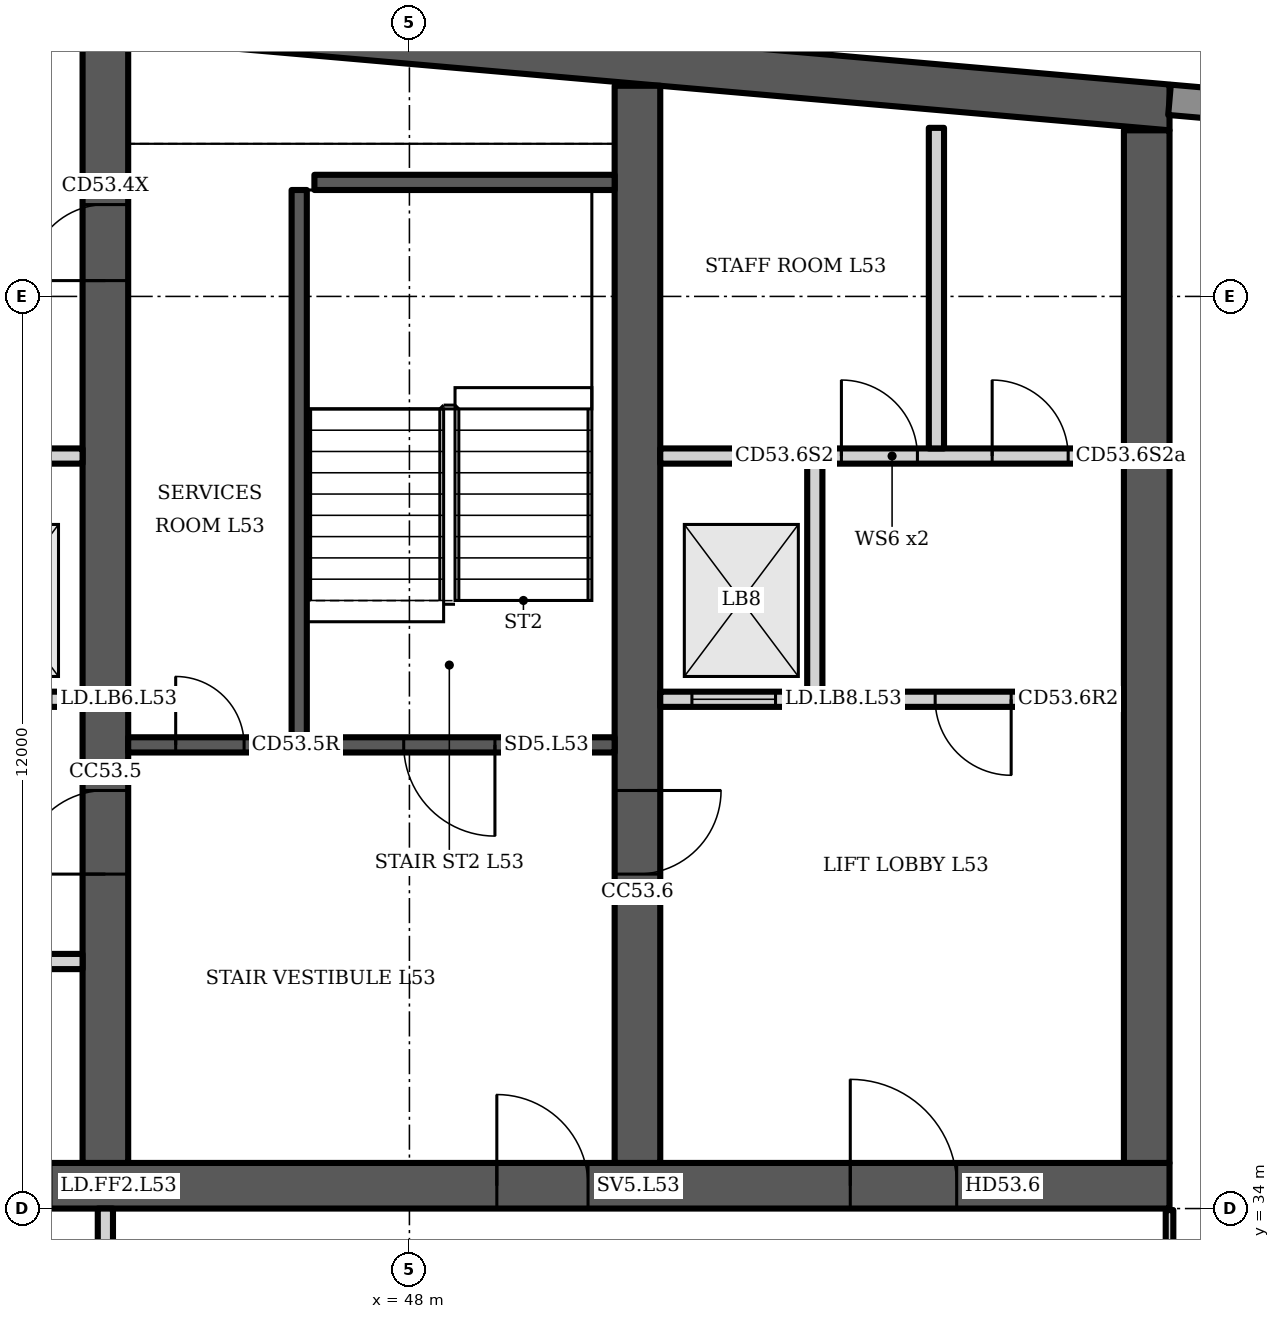
"""IFC4 building model, lengths in metres.
Left out: names, types, materials, properties, quantities, classifications, styles, units other than length and angle.
Written with IfcOpenShell. Run it as: python <this file> out.ifc"""

import sys

from ifc_helpers import new_model, si_unit, direction, frame, frame_2d, origin, place, context, subcontext, project, spatial, polyline, rectangle, outline, extrude, element, fill, save


model = new_model("IFC4")
c1 = context("Model", 3, precision=1e-05, world=origin(), true_north=direction((0.0, 1.0)))
c2 = subcontext(c1, "Body", "Model", "MODEL_VIEW")
j1 = project(units=[si_unit("LENGTHUNIT", "METRE"), si_unit("PLANEANGLEUNIT", "RADIAN")], contexts=[c1])
p1 = place(None, origin())
s1 = spatial("IfcSite", under=j1, at=p1, CompositionType="ELEMENT")
p2 = place(p1, origin())
s2 = spatial("IfcBuilding", under=s1, at=p2, CompositionType="ELEMENT")
p3 = place(p2, frame((0.0, 0.0, 214.3)))
s3 = spatial("IfcBuildingStorey", under=s2, at=p3, CompositionType="ELEMENT", Elevation=214.3)
p4 = place(p3, frame((0.0, 0.0, -0.0)))
e1 = element("IfcWall", 1, at=p4, inside=s3, PredefinedType="SHEAR", context=c2, shape_type="SweptSolid", body=[
    extrude(outline(polyline([(23.0, 48.185), (40.5, 49.716), (58.0, 48.185), (58.0, 48.787), (40.5, 50.318), (23.0, 48.787), (23.0, 48.185)])), origin(), (0.0, 0.0, 1.0), 3.6),
])
p5 = place(p3, frame((23.0, 34.3, 0.0), z_axis=(0.0, 0.0, 1.0), x_axis=(1.0, 0.0, 0.0)))
e2 = element("IfcWall", 2, at=p5, inside=s3, PredefinedType="SHEAR", context=c2, shape_type="SweptSolid", body=[
    extrude(rectangle(XDim=35.0, YDim=0.6, at=frame_2d((17.5, 0.0))), origin(), (0.0, 0.0, 1.0), 3.6),
])
p6 = place(p5, frame((0.65, 0.0, 0.0)))
e3 = element("IfcOpeningElement", 3, at=p6, cuts=e2, PredefinedType="OPENING", context=c2, shape_type="SweptSolid", body=[
    extrude(rectangle(XDim=1.2, YDim=2.1, at=frame_2d((0.6, 1.05))), frame((0.0, 0.31, 0.0), z_axis=(0.0, -1.0, 0.0), x_axis=(1.0, 0.0, 0.0)), (0.0, 0.0, 1.0), 0.62),
])
p7 = place(p5, frame((7.717, 0.0, 0.0)))
e4 = element("IfcOpeningElement", 4, at=p7, cuts=e2, PredefinedType="OPENING", context=c2, shape_type="SweptSolid", body=[
    extrude(rectangle(XDim=1.1, YDim=2.1, at=frame_2d((0.55, 1.05))), frame((0.0, 0.31, 0.0), z_axis=(0.0, -1.0, 0.0), x_axis=(1.0, 0.0, 0.0)), (0.0, 0.0, 1.0), 0.62),
])
p8 = place(p5, frame((12.183, 0.0, 0.0)))
e5 = element("IfcOpeningElement", 5, at=p8, cuts=e2, PredefinedType="OPENING", context=c2, shape_type="SweptSolid", body=[
    extrude(rectangle(XDim=1.1, YDim=2.1, at=frame_2d((0.55, 1.05))), frame((0.0, 0.31, 0.0), z_axis=(0.0, -1.0, 0.0), x_axis=(1.0, 0.0, 0.0)), (0.0, 0.0, 1.0), 0.62),
])
p9 = place(p5, frame((9.8, 0.0, 0.0)))
e6 = element("IfcOpeningElement", 6, at=p9, cuts=e2, PredefinedType="OPENING", context=c2, shape_type="SweptSolid", body=[
    extrude(rectangle(XDim=1.4, YDim=2.1, at=frame_2d((0.7, 1.05))), frame((0.0, 0.31, 0.0), z_axis=(0.0, -1.0, 0.0), x_axis=(1.0, 0.0, 0.0)), (0.0, 0.0, 1.0), 0.62),
])
p10 = place(p5, frame((14.717, 0.0, 0.0)))
e7 = element("IfcOpeningElement", 7, at=p10, cuts=e2, PredefinedType="OPENING", context=c2, shape_type="SweptSolid", body=[
    extrude(rectangle(XDim=1.1, YDim=2.1, at=frame_2d((0.55, 1.05))), frame((0.0, 0.31, 0.0), z_axis=(0.0, -1.0, 0.0), x_axis=(1.0, 0.0, 0.0)), (0.0, 0.0, 1.0), 0.62),
])
p11 = place(p5, frame((16.95, 0.0, 0.0)))
e8 = element("IfcOpeningElement", 8, at=p11, cuts=e2, PredefinedType="OPENING", context=c2, shape_type="SweptSolid", body=[
    extrude(rectangle(XDim=1.1, YDim=2.1, at=frame_2d((0.55, 1.05))), frame((0.0, 0.31, 0.0), z_axis=(0.0, -1.0, 0.0), x_axis=(1.0, 0.0, 0.0)), (0.0, 0.0, 1.0), 0.62),
])
p12 = place(p5, frame((19.183, 0.0, 0.0)))
e9 = element("IfcOpeningElement", 9, at=p12, cuts=e2, PredefinedType="OPENING", context=c2, shape_type="SweptSolid", body=[
    extrude(rectangle(XDim=1.1, YDim=2.1, at=frame_2d((0.55, 1.05))), frame((0.0, 0.31, 0.0), z_axis=(0.0, -1.0, 0.0), x_axis=(1.0, 0.0, 0.0)), (0.0, 0.0, 1.0), 0.62),
])
p13 = place(p5, frame((26.15, 0.0, 0.0)))
e10 = element("IfcOpeningElement", 10, at=p13, cuts=e2, PredefinedType="OPENING", context=c2, shape_type="SweptSolid", body=[
    extrude(rectangle(XDim=1.2, YDim=2.1, at=frame_2d((0.6, 1.05))), frame((0.0, 0.31, 0.0), z_axis=(0.0, -1.0, 0.0), x_axis=(1.0, 0.0, 0.0)), (0.0, 0.0, 1.0), 0.62),
])
p14 = place(p5, frame((30.8, 0.0, 0.0)))
e11 = element("IfcOpeningElement", 11, at=p14, cuts=e2, PredefinedType="OPENING", context=c2, shape_type="SweptSolid", body=[
    extrude(rectangle(XDim=1.4, YDim=2.1, at=frame_2d((0.7, 1.05))), frame((0.0, 0.31, 0.0), z_axis=(0.0, -1.0, 0.0), x_axis=(1.0, 0.0, 0.0)), (0.0, 0.0, 1.0), 0.62),
])
p15 = place(p3, frame((44.0, 34.6, 0.0), z_axis=(0.0, 0.0, 1.0), x_axis=(0.0, 1.0, 0.0)))
e12 = element("IfcWall", 12, at=p15, inside=s3, PredefinedType="SHEAR", context=c2, shape_type="SweptSolid", body=[
    extrude(rectangle(XDim=14.784, YDim=0.6, at=frame_2d((7.392, 0.0))), origin(), (0.0, 0.0, 1.0), 3.6),
])
p16 = place(p15, frame((11.608, 0.0, 0.0)))
e13 = element("IfcOpeningElement", 13, at=p16, cuts=e12, PredefinedType="OPENING", context=c2, shape_type="SweptSolid", body=[
    extrude(rectangle(XDim=1.0, YDim=2.1, at=frame_2d((0.5, 1.05))), frame((0.0, 0.31, 0.0), z_axis=(0.0, -1.0, 0.0), x_axis=(1.0, 0.0, 0.0)), (0.0, 0.0, 1.0), 0.62),
])
p17 = place(p15, frame((3.8, 0.0, 0.0)))
e14 = element("IfcOpeningElement", 14, at=p17, cuts=e12, PredefinedType="OPENING", context=c2, shape_type="SweptSolid", body=[
    extrude(rectangle(XDim=1.1, YDim=2.1, at=frame_2d((0.55, 1.05))), frame((0.0, 0.31, 0.0), z_axis=(0.0, -1.0, 0.0), x_axis=(1.0, 0.0, 0.0)), (0.0, 0.0, 1.0), 0.62),
])
p18 = place(p3, frame((51.0, 34.6, 0.0), z_axis=(0.0, 0.0, 1.0), x_axis=(0.0, 1.0, 0.0)))
e15 = element("IfcWall", 15, at=p18, inside=s3, PredefinedType="SHEAR", context=c2, shape_type="SweptSolid", body=[
    extrude(rectangle(XDim=14.171, YDim=0.6, at=frame_2d((7.085, 0.0))), origin(), (0.0, 0.0, 1.0), 3.6),
])
p19 = place(p18, frame((3.8, 0.0, 0.0)))
e16 = element("IfcOpeningElement", 16, at=p19, cuts=e15, PredefinedType="OPENING", context=c2, shape_type="SweptSolid", body=[
    extrude(rectangle(XDim=1.1, YDim=2.1, at=frame_2d((0.55, 1.05))), frame((0.0, 0.31, 0.0), z_axis=(0.0, -1.0, 0.0), x_axis=(1.0, 0.0, 0.0)), (0.0, 0.0, 1.0), 0.62),
])
p20 = place(p3, frame((57.7, 34.6, 0.0), z_axis=(0.0, 0.0, 1.0), x_axis=(0.0, 1.0, 0.0)))
e17 = element("IfcWall", 17, at=p20, inside=s3, PredefinedType="SHEAR", context=c2, shape_type="SweptSolid", body=[
    extrude(rectangle(XDim=13.585, YDim=0.6, at=frame_2d((6.792, 0.0))), origin(), (0.0, 0.0, 1.0), 3.6),
])
p21 = place(p3, frame((60.983, 48.326, 0.0), z_axis=(0.0, 0.0, 1.0), x_axis=(-0.996194, 0.087168, 0.0)))
e18 = element("IfcWall", 18, at=p21, inside=s3, PredefinedType="SOLIDWALL", context=c2, shape_type="SweptSolid", body=[
    extrude(rectangle(XDim=2.994, YDim=0.4, at=frame_2d((1.497, 0.0))), origin(), (0.0, 0.0, 1.0), 3.2),
])
p22 = place(p3, frame((37.3, 40.7, 0.0), z_axis=(0.0, 0.0, 1.0), x_axis=(1.0, 0.0, 0.0)))
e19 = element("IfcWall", 19, at=p22, inside=s3, PredefinedType="PARTITIONING", context=c2, shape_type="SweptSolid", body=[
    extrude(rectangle(XDim=6.4, YDim=0.2, at=frame_2d((3.2, 0.0))), origin(), (0.0, 0.0, 1.0), 3.2),
])
p23 = place(p22, frame((0.417, 0.0, 0.0)))
e20 = element("IfcOpeningElement", 20, at=p23, cuts=e19, PredefinedType="OPENING", context=c2, shape_type="SweptSolid", body=[
    extrude(rectangle(XDim=1.1, YDim=2.1, at=frame_2d((0.55, 1.05))), frame((0.0, 0.11, 0.0), z_axis=(0.0, -1.0, 0.0), x_axis=(1.0, 0.0, 0.0)), (0.0, 0.0, 1.0), 0.22),
])
p24 = place(p22, frame((2.65, 0.0, 0.0)))
e21 = element("IfcOpeningElement", 21, at=p24, cuts=e19, PredefinedType="OPENING", context=c2, shape_type="SweptSolid", body=[
    extrude(rectangle(XDim=1.1, YDim=2.1, at=frame_2d((0.55, 1.05))), frame((0.0, 0.11, 0.0), z_axis=(0.0, -1.0, 0.0), x_axis=(1.0, 0.0, 0.0)), (0.0, 0.0, 1.0), 0.22),
])
p25 = place(p22, frame((4.883, 0.0, 0.0)))
e22 = element("IfcOpeningElement", 22, at=p25, cuts=e19, PredefinedType="OPENING", context=c2, shape_type="SweptSolid", body=[
    extrude(rectangle(XDim=1.1, YDim=2.1, at=frame_2d((0.55, 1.05))), frame((0.0, 0.11, 0.0), z_axis=(0.0, -1.0, 0.0), x_axis=(1.0, 0.0, 0.0)), (0.0, 0.0, 1.0), 0.22),
])
p26 = place(p3, frame((0.0, 0.0, -0.0)))
e23 = element("IfcWall", 23, at=p26, inside=s3, PredefinedType="PARTITIONING", context=c2, shape_type="SweptSolid", body=[
    extrude(outline(polyline([(41.567, 37.1), (39.433, 37.1), (39.433, 34.6), (39.233, 34.6), (39.233, 37.45), (37.3, 37.45), (37.3, 37.65), (39.233, 37.65), (39.433, 37.65), (39.433, 37.3), (41.567, 37.3), (41.567, 37.35), (41.767, 37.35), (43.7, 37.35), (43.7, 37.15), (41.767, 37.15), (41.767, 34.6), (41.567, 34.6), (41.567, 37.1)])), origin(), (0.0, 0.0, 1.0), 3.2),
])
p27 = place(p3, frame((0.0, 0.0, -0.0)))
e24 = element("IfcWall", 24, at=p27, inside=s3, PredefinedType="PARTITIONING", context=c2, shape_type="SweptSolid", body=[
    extrude(outline(polyline([(39.433, 40.8), (39.233, 40.8), (39.233, 43.8), (37.3, 43.8), (37.3, 44.0), (43.7, 44.0), (43.7, 43.8), (41.767, 43.8), (41.767, 40.8), (41.567, 40.8), (41.567, 43.8), (39.433, 43.8), (39.433, 40.8)])), origin(), (0.0, 0.0, 1.0), 3.2),
])
p28 = place(p3, frame((44.3, 40.1, 0.0), z_axis=(0.0, 0.0, 1.0), x_axis=(1.0, 0.0, 0.0)))
e25 = element("IfcWall", 25, at=p28, inside=s3, PredefinedType="SHEAR", context=c2, shape_type="SweptSolid", body=[
    extrude(rectangle(XDim=6.4, YDim=0.2, at=frame_2d((3.2, 0.0))), origin(), (0.0, 0.0, 1.0), 3.2),
])
p29 = place(p28, frame((3.625, 0.0, 0.0)))
e26 = element("IfcOpeningElement", 26, at=p29, cuts=e25, PredefinedType="OPENING", context=c2, shape_type="SweptSolid", body=[
    extrude(rectangle(XDim=1.2, YDim=2.1, at=frame_2d((0.6, 1.05))), frame((0.0, 0.11, 0.0), z_axis=(0.0, -1.0, 0.0), x_axis=(1.0, 0.0, 0.0)), (0.0, 0.0, 1.0), 0.22),
])
p30 = place(p28, frame((0.625, 0.0, 0.0)))
e27 = element("IfcOpeningElement", 27, at=p30, cuts=e25, PredefinedType="OPENING", context=c2, shape_type="SweptSolid", body=[
    extrude(rectangle(XDim=0.9, YDim=2.1, at=frame_2d((0.45, 1.05))), frame((0.0, 0.11, 0.0), z_axis=(0.0, -1.0, 0.0), x_axis=(1.0, 0.0, 0.0)), (0.0, 0.0, 1.0), 0.22),
])
p31 = place(p3, frame((46.55, 40.2, 0.0), z_axis=(0.0, 0.0, 1.0), x_axis=(0.0, 1.0, 0.0)))
e28 = element("IfcWall", 28, at=p31, inside=s3, PredefinedType="SHEAR", context=c2, shape_type="SweptSolid", body=[
    extrude(rectangle(XDim=7.2, YDim=0.2, at=frame_2d((3.6, 0.0))), origin(), (0.0, 0.0, 1.0), 3.2),
])
p32 = place(p3, frame((46.75, 47.5, 0.0), z_axis=(0.0, 0.0, 1.0), x_axis=(1.0, 0.0, 0.0)))
e29 = element("IfcWall", 29, at=p32, inside=s3, PredefinedType="SHEAR", context=c2, shape_type="SweptSolid", body=[
    extrude(rectangle(XDim=3.95, YDim=0.2, at=frame_2d((1.975, 0.0))), origin(), (0.0, 0.0, 1.0), 3.2),
])
p33 = place(p3, frame((51.3, 40.7, 0.0), z_axis=(0.0, 0.0, 1.0), x_axis=(1.0, 0.0, 0.0)))
e30 = element("IfcWall", 30, at=p33, inside=s3, PredefinedType="PARTITIONING", context=c2, shape_type="SweptSolid", body=[
    extrude(rectangle(XDim=6.1, YDim=0.2, at=frame_2d((3.05, 0.0))), origin(), (0.0, 0.0, 1.0), 3.2),
])
p34 = place(p33, frame((0.417, 0.0, 0.0)))
e31 = element("IfcOpeningElement", 31, at=p34, cuts=e30, PredefinedType="OPENING", context=c2, shape_type="SweptSolid", body=[
    extrude(rectangle(XDim=1.1, YDim=2.1, at=frame_2d((0.55, 1.05))), frame((0.0, 0.11, 0.0), z_axis=(0.0, -1.0, 0.0), x_axis=(1.0, 0.0, 0.0)), (0.0, 0.0, 1.0), 0.22),
])
p35 = place(p33, frame((3.617, 0.0, 0.0)))
e32 = element("IfcOpeningElement", 32, at=p35, cuts=e30, PredefinedType="OPENING", context=c2, shape_type="SweptSolid", body=[
    extrude(rectangle(XDim=1.0, YDim=2.1, at=frame_2d((0.5, 1.05))), frame((0.0, 0.11, 0.0), z_axis=(0.0, -1.0, 0.0), x_axis=(1.0, 0.0, 0.0)), (0.0, 0.0, 1.0), 0.22),
])
p36 = place(p3, frame((51.3, 43.9, 0.0), z_axis=(0.0, 0.0, 1.0), x_axis=(1.0, 0.0, 0.0)))
e33 = element("IfcWall", 33, at=p36, inside=s3, PredefinedType="PARTITIONING", context=c2, shape_type="SweptSolid", body=[
    extrude(rectangle(XDim=6.1, YDim=0.2, at=frame_2d((3.05, 0.0))), origin(), (0.0, 0.0, 1.0), 3.2),
])
p37 = place(p36, frame((2.383, 0.0, 0.0)))
e34 = element("IfcOpeningElement", 34, at=p37, cuts=e33, PredefinedType="OPENING", context=c2, shape_type="SweptSolid", body=[
    extrude(rectangle(XDim=1.0, YDim=2.1, at=frame_2d((0.5, 1.05))), frame((0.0, 0.11, 0.0), z_axis=(0.0, -1.0, 0.0), x_axis=(1.0, 0.0, 0.0)), (0.0, 0.0, 1.0), 0.22),
])
p38 = place(p36, frame((4.367, 0.0, 0.0)))
e35 = element("IfcOpeningElement", 35, at=p38, cuts=e33, PredefinedType="OPENING", context=c2, shape_type="SweptSolid", body=[
    extrude(rectangle(XDim=1.0, YDim=2.1, at=frame_2d((0.5, 1.05))), frame((0.0, 0.11, 0.0), z_axis=(0.0, -1.0, 0.0), x_axis=(1.0, 0.0, 0.0)), (0.0, 0.0, 1.0), 0.22),
])
p39 = place(p3, frame((0.0, 0.0, -0.0)))
e36 = element("IfcWall", 36, at=p39, inside=s3, PredefinedType="PARTITIONING", context=c2, shape_type="SweptSolid", body=[
    extrude(outline(polyline([(53.433, 40.8), (53.433, 43.8), (53.233, 43.8), (53.233, 40.8), (53.433, 40.8)])), origin(), (0.0, 0.0, 1.0), 3.2),
])
p40 = place(p3, frame((54.933, 44.0, 0.0), z_axis=(0.0, 0.0, 1.0), x_axis=(0.0, 1.0, 0.0)))
e37 = element("IfcWall", 37, at=p40, inside=s3, PredefinedType="PARTITIONING", context=c2, shape_type="SweptSolid", body=[
    extrude(rectangle(XDim=4.218, YDim=0.2, at=frame_2d((2.109, 0.0))), origin(), (0.0, 0.0, 1.0), 3.2),
])
p41 = place(p3, frame((44.0, 30.5, 0.0), z_axis=(0.0, 0.0, 1.0), x_axis=(0.0, 1.0, 0.0)))
e38 = element("IfcWall", 38, at=p41, inside=s3, PredefinedType="PARTITIONING", context=c2, shape_type="SweptSolid", body=[
    extrude(rectangle(XDim=3.5, YDim=0.2, at=frame_2d((1.75, 0.0))), origin(), (0.0, 0.0, 1.0), 3.2),
])
p42 = place(p41, frame((1.2, 0.0, 0.0)))
e39 = element("IfcOpeningElement", 39, at=p42, cuts=e38, PredefinedType="OPENING", context=c2, shape_type="SweptSolid", body=[
    extrude(rectangle(XDim=1.1, YDim=2.1, at=frame_2d((0.55, 1.05))), frame((0.0, 0.11, 0.0), z_axis=(0.0, -1.0, 0.0), x_axis=(1.0, 0.0, 0.0)), (0.0, 0.0, 1.0), 0.22),
])
p43 = place(p3, frame((58.0, 30.5, 0.0), z_axis=(0.0, 0.0, 1.0), x_axis=(0.0, 1.0, 0.0)))
e40 = element("IfcWall", 40, at=p43, inside=s3, PredefinedType="PARTITIONING", context=c2, shape_type="SweptSolid", body=[
    extrude(rectangle(XDim=3.48, YDim=0.1, at=frame_2d((1.74, 0.0))), origin(), (0.0, 0.0, 1.0), 3.2),
])
p44 = place(p16, origin())
e41 = element("IfcDoor", 41, at=p44, inside=s3, OperationType="SINGLE_SWING_LEFT", PredefinedType="DOOR", context=c2, shape_type="SweptSolid", body=[
    extrude(rectangle(XDim=1.0, YDim=2.1, at=frame_2d((0.5, 1.05))), frame((0.0, 0.025, 0.0), z_axis=(0.0, -1.0, 0.0), x_axis=(1.0, 0.0, 0.0)), (0.0, 0.0, 1.0), 0.05),
])
fill(e13, e41)
p45 = place(p29, origin())
e42 = element("IfcDoor", 42, at=p45, inside=s3, OperationType="SINGLE_SWING_RIGHT", PredefinedType="DOOR", context=c2, shape_type="SweptSolid", body=[
    extrude(rectangle(XDim=1.2, YDim=2.1, at=frame_2d((0.6, 1.05))), frame((0.0, 0.025, 0.0), z_axis=(0.0, -1.0, 0.0), x_axis=(1.0, 0.0, 0.0)), (0.0, 0.0, 1.0), 0.05),
])
fill(e26, e42)
p46 = place(p30, origin())
e43 = element("IfcDoor", 43, at=p46, inside=s3, OperationType="SINGLE_SWING_LEFT", PredefinedType="DOOR", context=c2, shape_type="SweptSolid", body=[
    extrude(rectangle(XDim=0.9, YDim=2.1, at=frame_2d((0.45, 1.05))), frame((0.0, 0.025, 0.0), z_axis=(0.0, -1.0, 0.0), x_axis=(1.0, 0.0, 0.0)), (0.0, 0.0, 1.0), 0.05),
])
fill(e27, e43)
p47 = place(p13, origin())
e44 = element("IfcDoor", 44, at=p47, inside=s3, OperationType="SINGLE_SWING_LEFT", PredefinedType="DOOR", context=c2, shape_type="SweptSolid", body=[
    extrude(rectangle(XDim=1.2, YDim=2.1, at=frame_2d((0.6, 1.05))), frame((0.0, 0.025, 0.0), z_axis=(0.0, -1.0, 0.0), x_axis=(1.0, 0.0, 0.0)), (0.0, 0.0, 1.0), 0.05),
])
fill(e10, e44)
p48 = place(p14, origin())
e45 = element("IfcDoor", 45, at=p48, inside=s3, OperationType="DOUBLE_DOOR_SINGLE_SWING", PredefinedType="DOOR", context=c2, shape_type="SweptSolid", body=[
    extrude(rectangle(XDim=1.4, YDim=2.1, at=frame_2d((0.7, 1.05))), frame((0.0, 0.025, 0.0), z_axis=(0.0, -1.0, 0.0), x_axis=(1.0, 0.0, 0.0)), (0.0, 0.0, 1.0), 0.05),
])
fill(e11, e45)
p49 = place(p34, origin())
e46 = element("IfcDoor", 46, at=p49, inside=s3, OperationType="DOUBLE_DOOR_SLIDING", PredefinedType="DOOR", context=c2, shape_type="SweptSolid", body=[
    extrude(rectangle(XDim=1.1, YDim=2.1, at=frame_2d((0.55, 1.05))), frame((0.0, 0.025, 0.0), z_axis=(0.0, -1.0, 0.0), x_axis=(1.0, 0.0, 0.0)), (0.0, 0.0, 1.0), 0.05),
])
fill(e31, e46)
p50 = place(p35, origin())
e47 = element("IfcDoor", 47, at=p50, inside=s3, OperationType="SINGLE_SWING_RIGHT", PredefinedType="DOOR", context=c2, shape_type="SweptSolid", body=[
    extrude(rectangle(XDim=1.0, YDim=2.1, at=frame_2d((0.5, 1.05))), frame((0.0, 0.025, 0.0), z_axis=(0.0, -1.0, 0.0), x_axis=(1.0, 0.0, 0.0)), (0.0, 0.0, 1.0), 0.05),
])
fill(e32, e47)
p51 = place(p37, origin())
e48 = element("IfcDoor", 48, at=p51, inside=s3, OperationType="SINGLE_SWING_LEFT", PredefinedType="DOOR", context=c2, shape_type="SweptSolid", body=[
    extrude(rectangle(XDim=1.0, YDim=2.1, at=frame_2d((0.5, 1.05))), frame((0.0, 0.025, 0.0), z_axis=(0.0, -1.0, 0.0), x_axis=(1.0, 0.0, 0.0)), (0.0, 0.0, 1.0), 0.05),
])
fill(e34, e48)
p52 = place(p38, origin())
e49 = element("IfcDoor", 49, at=p52, inside=s3, OperationType="SINGLE_SWING_LEFT", PredefinedType="DOOR", context=c2, shape_type="SweptSolid", body=[
    extrude(rectangle(XDim=1.0, YDim=2.1, at=frame_2d((0.5, 1.05))), frame((0.0, 0.025, 0.0), z_axis=(0.0, -1.0, 0.0), x_axis=(1.0, 0.0, 0.0)), (0.0, 0.0, 1.0), 0.05),
])
fill(e35, e49)
p53 = place(p17, origin())
e50 = element("IfcDoor", 50, at=p53, inside=s3, OperationType="SINGLE_SWING_LEFT", PredefinedType="DOOR", context=c2, shape_type="SweptSolid", body=[
    extrude(rectangle(XDim=1.1, YDim=2.1, at=frame_2d((0.55, 1.05))), frame((0.0, 0.025, 0.0), z_axis=(0.0, -1.0, 0.0), x_axis=(1.0, 0.0, 0.0)), (0.0, 0.0, 1.0), 0.05),
])
fill(e14, e50)
p54 = place(p19, origin())
e51 = element("IfcDoor", 51, at=p54, inside=s3, OperationType="SINGLE_SWING_RIGHT", PredefinedType="DOOR", context=c2, shape_type="SweptSolid", body=[
    extrude(rectangle(XDim=1.1, YDim=2.1, at=frame_2d((0.55, 1.05))), frame((0.0, 0.025, 0.0), z_axis=(0.0, -1.0, 0.0), x_axis=(1.0, 0.0, 0.0)), (0.0, 0.0, 1.0), 0.05),
])
fill(e16, e51)
save(model, sys.argv[1])
